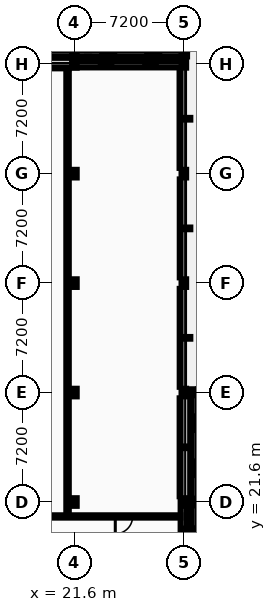
"""IFC4 building model, lengths in metres.
Left out: names, types, materials, properties, quantities, classifications, styles, units other than length and angle.
Written with IfcOpenShell. Run it as: python <this file> out.ifc"""

import sys

from ifc_helpers import new_model, si_unit, direction, frame, frame_2d, origin, origin_2d, place, context, subcontext, project, spatial, rectangle, i_section, extrude, element, fill, save


model = new_model("IFC4")
c1 = context("Model", 3, precision=1e-05, world=origin(), true_north=direction((0.0, 1.0)))
c2 = subcontext(c1, "Body", "Model", "MODEL_VIEW")
j1 = project(units=[si_unit("LENGTHUNIT", "METRE"), si_unit("PLANEANGLEUNIT", "RADIAN")], contexts=[c1])
p1 = place(None, origin())
s1 = spatial("IfcSite", under=j1, at=p1, CompositionType="ELEMENT")
p2 = place(p1, origin())
s2 = spatial("IfcBuilding", under=s1, at=p2, CompositionType="ELEMENT")
p3 = place(p2, origin())
s3 = spatial("IfcBuildingStorey", under=s2, at=p3, CompositionType="ELEMENT", Elevation=0.0)
for number, where, z_axis, x_axis in (
    (1, (21.6, 21.6, 0.0), (0.0, 0.0, 1.0), (1.0, 0.0, 0.0)),
    (2, (21.6, 28.8, 0.0), (0.0, 0.0, 1.0), (1.0, 0.0, 0.0)),
    (3, (21.6, 36.0, 0.0), (0.0, 0.0, 1.0), (1.0, 0.0, 0.0)),
    (4, (21.6, 43.2, 0.0), (0.0, 0.0, 1.0), (1.0, 0.0, 0.0)),
):
    element("IfcColumn", number, at=place(p3, frame(where, z_axis=z_axis, x_axis=x_axis)), inside=s3, PredefinedType="COLUMN", context=c2, shape_type="SweptSolid", body=[
        extrude(i_section(OverallWidth=0.3, OverallDepth=0.5, WebThickness=0.014, FlangeThickness=0.028, FilletRadius=0.027, at=origin_2d()), origin(), (0.0, 0.0, 1.0), 5.2),
    ])
p4 = place(p3, frame((21.6, 50.4, 0.0), z_axis=(0.0, 0.0, 1.0), x_axis=(1.0, 0.0, 0.0)))
e5 = element("IfcColumn", 5, at=p4, inside=s3, PredefinedType="COLUMN", context=c2, shape_type="SweptSolid", body=[
    extrude(i_section(OverallWidth=0.3, OverallDepth=0.45, WebThickness=0.014, FlangeThickness=0.026, FilletRadius=0.027, at=origin_2d()), origin(), (0.0, 0.0, 1.0), 5.2),
])
p5 = place(p3, frame((21.6, 51.12, 0.0), z_axis=(0.0, 0.0, 1.0), x_axis=(1.0, 0.0, 0.0)))
e6 = element("IfcColumn", 6, at=p5, inside=s3, PredefinedType="COLUMN", context=c2, shape_type="SweptSolid", body=[
    extrude(i_section(OverallWidth=0.3, OverallDepth=0.36, WebThickness=0.012, FlangeThickness=0.022, FilletRadius=0.027, at=origin_2d()), origin(), (0.0, 0.0, 1.0), 5.2),
])
for number, where, z_axis, x_axis in (
    (7, (28.8, 21.6, 0.0), (0.0, 0.0, 1.0), (1.0, 0.0, 0.0)),
    (8, (28.8, 28.8, 0.0), (0.0, 0.0, 1.0), (1.0, 0.0, 0.0)),
    (9, (28.8, 36.0, 0.0), (0.0, 0.0, 1.0), (1.0, 0.0, 0.0)),
    (10, (28.8, 43.2, 0.0), (0.0, 0.0, 1.0), (1.0, 0.0, 0.0)),
):
    element("IfcColumn", number, at=place(p3, frame(where, z_axis=z_axis, x_axis=x_axis)), inside=s3, PredefinedType="COLUMN", context=c2, shape_type="SweptSolid", body=[
        extrude(i_section(OverallWidth=0.3, OverallDepth=0.5, WebThickness=0.014, FlangeThickness=0.028, FilletRadius=0.027, at=origin_2d()), origin(), (0.0, 0.0, 1.0), 5.2),
    ])
p6 = place(p3, frame((28.8, 50.4, 0.0), z_axis=(0.0, 0.0, 1.0), x_axis=(1.0, 0.0, 0.0)))
e11 = element("IfcColumn", 11, at=p6, inside=s3, PredefinedType="COLUMN", context=c2, shape_type="SweptSolid", body=[
    extrude(i_section(OverallWidth=0.3, OverallDepth=0.45, WebThickness=0.014, FlangeThickness=0.026, FilletRadius=0.027, at=origin_2d()), origin(), (0.0, 0.0, 1.0), 5.2),
])
p7 = place(p3, frame((28.8, 51.12, 0.0), z_axis=(0.0, 0.0, 1.0), x_axis=(1.0, 0.0, 0.0)))
e12 = element("IfcColumn", 12, at=p7, inside=s3, PredefinedType="COLUMN", context=c2, shape_type="SweptSolid", body=[
    extrude(i_section(OverallWidth=0.3, OverallDepth=0.36, WebThickness=0.012, FlangeThickness=0.022, FilletRadius=0.027, at=origin_2d()), origin(), (0.0, 0.0, 1.0), 5.2),
])
p8 = place(p3, frame((29.52, 21.6, 0.0), z_axis=(0.0, 0.0, 1.0), x_axis=(1.0, 0.0, 0.0)))
e13 = element("IfcColumn", 13, at=p8, inside=s3, PredefinedType="COLUMN", context=c2, shape_type="SweptSolid", body=[
    extrude(i_section(OverallWidth=0.3, OverallDepth=0.45, WebThickness=0.014, FlangeThickness=0.026, FilletRadius=0.027, at=origin_2d()), origin(), (0.0, 0.0, 1.0), 5.2),
])
p9 = place(p3, frame((29.52, 28.8, 0.0), z_axis=(0.0, 0.0, 1.0), x_axis=(1.0, 0.0, 0.0)))
e14 = element("IfcColumn", 14, at=p9, inside=s3, PredefinedType="COLUMN", context=c2, shape_type="SweptSolid", body=[
    extrude(i_section(OverallWidth=0.3, OverallDepth=0.36, WebThickness=0.012, FlangeThickness=0.022, FilletRadius=0.027, at=origin_2d()), origin(), (0.0, 0.0, 1.0), 5.2),
])
p10 = place(p3, frame((28.8, 50.4, 0.0), z_axis=(0.0, 0.0, 1.0), x_axis=(-1.0, 0.0, 0.0)))
e15 = element("IfcWall", 15, at=p10, inside=s3, PredefinedType="STANDARD", context=c2, shape_type="SweptSolid", body=[
    extrude(rectangle(XDim=7.31, YDim=0.42, at=frame_2d((3.655, 0.0))), origin(), (0.0, 0.0, 1.0), 4.665),
])
p11 = place(p10, frame((1.743, 0.0, 1.1)))
e16 = element("IfcOpeningElement", 16, at=p11, cuts=e15, PredefinedType="OPENING", context=c2, shape_type="SweptSolid", body=[
    extrude(rectangle(XDim=0.9, YDim=1.6, at=frame_2d((0.45, 0.8))), frame((0.0, 0.22, 0.0), z_axis=(0.0, -1.0, 0.0), x_axis=(1.0, 0.0, 0.0)), (0.0, 0.0, 1.0), 0.44),
])
p12 = place(p10, frame((4.667, 0.0, 1.1)))
e17 = element("IfcOpeningElement", 17, at=p12, cuts=e15, PredefinedType="OPENING", context=c2, shape_type="SweptSolid", body=[
    extrude(rectangle(XDim=0.9, YDim=1.6, at=frame_2d((0.45, 0.8))), frame((0.0, 0.22, 0.0), z_axis=(0.0, -1.0, 0.0), x_axis=(1.0, 0.0, 0.0)), (0.0, 0.0, 1.0), 0.44),
])
p13 = place(p3, frame((28.8, 14.45, 0.0), z_axis=(0.0, 0.0, 1.0), x_axis=(0.0, 1.0, 0.0)))
e18 = element("IfcWall", 18, at=p13, inside=s3, PredefinedType="STANDARD", context=c2, shape_type="SweptSolid", body=[
    extrude(rectangle(XDim=7.15, YDim=0.42, at=frame_2d((3.575, 0.0))), origin(), (0.0, 0.0, 1.0), 4.97),
])
p14 = place(p13, frame((1.647, 0.0, 0.95)))
e19 = element("IfcOpeningElement", 19, at=p14, cuts=e18, PredefinedType="OPENING", context=c2, shape_type="SweptSolid", body=[
    extrude(rectangle(XDim=0.996, YDim=1.26, at=frame_2d((0.498, 0.63))), frame((0.0, 0.22, 0.0), z_axis=(0.0, -1.0, 0.0), x_axis=(1.0, 0.0, 0.0)), (0.0, 0.0, 1.0), 0.44),
])
p15 = place(p13, frame((4.507, 0.0, 0.95)))
e20 = element("IfcOpeningElement", 20, at=p15, cuts=e18, PredefinedType="OPENING", context=c2, shape_type="SweptSolid", body=[
    extrude(rectangle(XDim=0.996, YDim=1.26, at=frame_2d((0.498, 0.63))), frame((0.0, 0.22, 0.0), z_axis=(0.0, -1.0, 0.0), x_axis=(1.0, 0.0, 0.0)), (0.0, 0.0, 1.0), 0.44),
])
p16 = place(p3, frame((29.52, 21.6, 0.0), z_axis=(0.0, 0.0, 1.0), x_axis=(0.0, -1.0, 0.0)))
e21 = element("IfcWall", 21, at=p16, inside=s3, PredefinedType="STANDARD", context=c2, shape_type="SweptSolid", body=[
    extrude(rectangle(XDim=7.2, YDim=0.42, at=frame_2d((3.6, 0.0))), origin(), (0.0, 0.0, 1.0), 4.665),
])
p17 = place(p16, frame((1.628, 0.0, 0.95)))
e22 = element("IfcOpeningElement", 22, at=p17, cuts=e21, PredefinedType="OPENING", context=c2, shape_type="SweptSolid", body=[
    extrude(rectangle(XDim=1.064, YDim=1.296, at=frame_2d((0.532, 0.648))), frame((0.0, 0.22, 0.0), z_axis=(0.0, -1.0, 0.0), x_axis=(1.0, 0.0, 0.0)), (0.0, 0.0, 1.0), 0.44),
])
p18 = place(p16, frame((4.508, 0.0, 0.95)))
e23 = element("IfcOpeningElement", 23, at=p18, cuts=e21, PredefinedType="OPENING", context=c2, shape_type="SweptSolid", body=[
    extrude(rectangle(XDim=1.064, YDim=1.296, at=frame_2d((0.532, 0.648))), frame((0.0, 0.22, 0.0), z_axis=(0.0, -1.0, 0.0), x_axis=(1.0, 0.0, 0.0)), (0.0, 0.0, 1.0), 0.44),
])
p19 = place(p3, frame((29.52, 29.01, 0.0), z_axis=(0.0, 0.0, 1.0), x_axis=(0.0, -1.0, 0.0)))
e24 = element("IfcWall", 24, at=p19, inside=s3, PredefinedType="STANDARD", context=c2, shape_type="SweptSolid", body=[
    extrude(rectangle(XDim=7.41, YDim=0.42, at=frame_2d((3.705, 0.0))), origin(), (0.0, 0.0, 1.0), 4.665),
])
p20 = place(p19, frame((1.674, 0.0, 0.95)))
e25 = element("IfcOpeningElement", 25, at=p20, cuts=e24, PredefinedType="OPENING", context=c2, shape_type="SweptSolid", body=[
    extrude(rectangle(XDim=1.098, YDim=1.296, at=frame_2d((0.549, 0.648))), frame((0.0, 0.22, 0.0), z_axis=(0.0, -1.0, 0.0), x_axis=(1.0, 0.0, 0.0)), (0.0, 0.0, 1.0), 0.44),
])
p21 = place(p19, frame((4.638, 0.0, 0.95)))
e26 = element("IfcOpeningElement", 26, at=p21, cuts=e24, PredefinedType="OPENING", context=c2, shape_type="SweptSolid", body=[
    extrude(rectangle(XDim=1.098, YDim=1.296, at=frame_2d((0.549, 0.648))), frame((0.0, 0.22, 0.0), z_axis=(0.0, -1.0, 0.0), x_axis=(1.0, 0.0, 0.0)), (0.0, 0.0, 1.0), 0.44),
])
p22 = place(p3, frame((14.4, 51.12, 0.0), z_axis=(0.0, 0.0, 1.0), x_axis=(1.0, 0.0, 0.0)))
e27 = element("IfcWall", 27, at=p22, inside=s3, PredefinedType="STANDARD", context=c2, shape_type="SweptSolid", body=[
    extrude(rectangle(XDim=7.2, YDim=0.42, at=frame_2d((3.6, 0.0))), origin(), (0.0, 0.0, 1.0), 4.635),
])
p23 = place(p22, frame((1.679, 0.0, 0.95)))
e28 = element("IfcOpeningElement", 28, at=p23, cuts=e27, PredefinedType="OPENING", context=c2, shape_type="SweptSolid", body=[
    extrude(rectangle(XDim=0.962, YDim=1.404, at=frame_2d((0.481, 0.702))), frame((0.0, 0.22, 0.0), z_axis=(0.0, -1.0, 0.0), x_axis=(1.0, 0.0, 0.0)), (0.0, 0.0, 1.0), 0.44),
])
p24 = place(p22, frame((4.559, 0.0, 0.95)))
e29 = element("IfcOpeningElement", 29, at=p24, cuts=e27, PredefinedType="OPENING", context=c2, shape_type="SweptSolid", body=[
    extrude(rectangle(XDim=0.962, YDim=1.404, at=frame_2d((0.481, 0.702))), frame((0.0, 0.22, 0.0), z_axis=(0.0, -1.0, 0.0), x_axis=(1.0, 0.0, 0.0)), (0.0, 0.0, 1.0), 0.44),
])
p25 = place(p3, frame((21.6, 51.12, 0.0), z_axis=(0.0, 0.0, 1.0), x_axis=(1.0, 0.0, 0.0)))
e30 = element("IfcWall", 30, at=p25, inside=s3, PredefinedType="STANDARD", context=c2, shape_type="SweptSolid", body=[
    extrude(rectangle(XDim=7.41, YDim=0.42, at=frame_2d((3.705, 0.0))), origin(), (0.0, 0.0, 1.0), 4.635),
])
p26 = place(p25, frame((1.725, 0.0, 0.95)))
e31 = element("IfcOpeningElement", 31, at=p26, cuts=e30, PredefinedType="OPENING", context=c2, shape_type="SweptSolid", body=[
    extrude(rectangle(XDim=0.996, YDim=1.404, at=frame_2d((0.498, 0.702))), frame((0.0, 0.22, 0.0), z_axis=(0.0, -1.0, 0.0), x_axis=(1.0, 0.0, 0.0)), (0.0, 0.0, 1.0), 0.44),
])
p27 = place(p25, frame((4.689, 0.0, 0.95)))
e32 = element("IfcOpeningElement", 32, at=p27, cuts=e30, PredefinedType="OPENING", context=c2, shape_type="SweptSolid", body=[
    extrude(rectangle(XDim=0.996, YDim=1.404, at=frame_2d((0.498, 0.702))), frame((0.0, 0.22, 0.0), z_axis=(0.0, -1.0, 0.0), x_axis=(1.0, 0.0, 0.0)), (0.0, 0.0, 1.0), 0.44),
])
p28 = place(p3, frame((14.7, 20.65, 0.0), z_axis=(0.0, 0.0, 1.0), x_axis=(1.0, 0.0, 0.0)))
e33 = element("IfcWall", 33, at=p28, inside=s3, PredefinedType="PARTITIONING", context=c2, shape_type="SweptSolid", body=[
    extrude(rectangle(XDim=13.87, YDim=0.15, at=frame_2d((6.935, 0.0))), origin(), (0.0, 0.0, 1.0), 4.97),
])
p29 = place(p28, frame((2.681, 0.0, 0.0)))
e34 = element("IfcOpeningElement", 34, at=p29, cuts=e33, PredefinedType="OPENING", context=c2, shape_type="SweptSolid", body=[
    extrude(rectangle(XDim=1.088, YDim=2.068, at=frame_2d((0.544, 1.034))), frame((0.0, 0.085, 0.0), z_axis=(0.0, -1.0, 0.0), x_axis=(1.0, 0.0, 0.0)), (0.0, 0.0, 1.0), 0.17),
])
p30 = place(p28, frame((9.59, 0.0, 0.0)))
e35 = element("IfcOpeningElement", 35, at=p30, cuts=e33, PredefinedType="OPENING", context=c2, shape_type="SweptSolid", body=[
    extrude(rectangle(XDim=1.14, YDim=2.068, at=frame_2d((0.57, 1.034))), frame((0.0, 0.085, 0.0), z_axis=(0.0, -1.0, 0.0), x_axis=(1.0, 0.0, 0.0)), (0.0, 0.0, 1.0), 0.17),
])
p31 = place(p3, frame((14.78, 50.2, 0.0), z_axis=(0.0, 0.0, 1.0), x_axis=(1.0, 0.0, 0.0)))
e36 = element("IfcWall", 36, at=p31, inside=s3, PredefinedType="PARTITIONING", context=c2, shape_type="SweptSolid", body=[
    extrude(rectangle(XDim=6.44, YDim=0.142, at=frame_2d((3.22, 0.0))), origin(), (0.0, 0.0, 1.0), 4.665),
])
p32 = place(p3, frame((21.15, 20.725, 0.0), z_axis=(0.0, 0.0, 1.0), x_axis=(0.0, 1.0, 0.0)))
e37 = element("IfcWall", 37, at=p32, inside=s3, PredefinedType="PARTITIONING", context=c2, shape_type="SweptSolid", body=[
    extrude(rectangle(XDim=29.404, YDim=0.16, at=frame_2d((14.702, 0.0))), origin(), (0.0, 0.0, 1.0), 4.97),
])
p33 = place(p3, frame((28.6, 21.98, 0.0), z_axis=(0.0, 0.0, 1.0), x_axis=(0.0, 1.0, 0.0)))
e38 = element("IfcWall", 38, at=p33, inside=s3, PredefinedType="PARTITIONING", context=c2, shape_type="SweptSolid", body=[
    extrude(rectangle(XDim=6.44, YDim=0.15, at=frame_2d((3.22, 0.0))), origin(), (0.0, 0.0, 1.0), 4.665),
])
p34 = place(p3, frame((28.6, 29.18, 0.0), z_axis=(0.0, 0.0, 1.0), x_axis=(0.0, 1.0, 0.0)))
e39 = element("IfcWall", 39, at=p34, inside=s3, PredefinedType="PARTITIONING", context=c2, shape_type="SweptSolid", body=[
    extrude(rectangle(XDim=6.44, YDim=0.142, at=frame_2d((3.22, 0.0))), origin(), (0.0, 0.0, 1.0), 4.595),
])
p35 = place(p3, frame((28.6, 36.38, 0.0), z_axis=(0.0, 0.0, 1.0), x_axis=(0.0, 1.0, 0.0)))
e40 = element("IfcWall", 40, at=p35, inside=s3, PredefinedType="PARTITIONING", context=c2, shape_type="SweptSolid", body=[
    extrude(rectangle(XDim=6.44, YDim=0.135, at=frame_2d((3.22, 0.0))), origin(), (0.0, 0.0, 1.0), 4.595),
])
p36 = place(p3, frame((28.6, 43.58, 0.0), z_axis=(0.0, 0.0, 1.0), x_axis=(0.0, 1.0, 0.0)))
e41 = element("IfcWall", 41, at=p36, inside=s3, PredefinedType="PARTITIONING", context=c2, shape_type="SweptSolid", body=[
    extrude(rectangle(XDim=6.44, YDim=0.16, at=frame_2d((3.22, 0.0))), origin(), (0.0, 0.0, 1.0), 4.595),
])
p37 = place(p11, origin())
e42 = element("IfcWindow", 42, at=p37, inside=s3, PartitioningType="SINGLE_PANEL", PredefinedType="WINDOW", context=c2, shape_type="SweptSolid", body=[
    extrude(rectangle(XDim=0.9, YDim=1.6, at=frame_2d((0.45, 0.8))), frame((0.0, 0.03, 0.0), z_axis=(0.0, -1.0, 0.0), x_axis=(1.0, 0.0, 0.0)), (0.0, 0.0, 1.0), 0.06),
])
fill(e16, e42)
p38 = place(p12, origin())
e43 = element("IfcWindow", 43, at=p38, inside=s3, PartitioningType="SINGLE_PANEL", PredefinedType="WINDOW", context=c2, shape_type="SweptSolid", body=[
    extrude(rectangle(XDim=0.9, YDim=1.6, at=frame_2d((0.45, 0.8))), frame((0.0, 0.03, 0.0), z_axis=(0.0, -1.0, 0.0), x_axis=(1.0, 0.0, 0.0)), (0.0, 0.0, 1.0), 0.06),
])
fill(e17, e43)
p39 = place(p15, origin())
e44 = element("IfcWindow", 44, at=p39, inside=s3, PartitioningType="SINGLE_PANEL", PredefinedType="WINDOW", context=c2, shape_type="SweptSolid", body=[
    extrude(rectangle(XDim=0.996, YDim=1.26, at=frame_2d((0.498, 0.63))), frame((0.0, 0.03, 0.0), z_axis=(0.0, -1.0, 0.0), x_axis=(1.0, 0.0, 0.0)), (0.0, 0.0, 1.0), 0.06),
])
fill(e20, e44)
p40 = place(p17, origin())
e45 = element("IfcWindow", 45, at=p40, inside=s3, PartitioningType="SINGLE_PANEL", PredefinedType="WINDOW", context=c2, shape_type="SweptSolid", body=[
    extrude(rectangle(XDim=1.064, YDim=1.296, at=frame_2d((0.532, 0.648))), frame((0.0, 0.03, 0.0), z_axis=(0.0, -1.0, 0.0), x_axis=(1.0, 0.0, 0.0)), (0.0, 0.0, 1.0), 0.06),
])
fill(e22, e45)
p41 = place(p20, origin())
e46 = element("IfcWindow", 46, at=p41, inside=s3, PartitioningType="SINGLE_PANEL", PredefinedType="WINDOW", context=c2, shape_type="SweptSolid", body=[
    extrude(rectangle(XDim=1.098, YDim=1.296, at=frame_2d((0.549, 0.648))), frame((0.0, 0.03, 0.0), z_axis=(0.0, -1.0, 0.0), x_axis=(1.0, 0.0, 0.0)), (0.0, 0.0, 1.0), 0.06),
])
fill(e25, e46)
p42 = place(p21, origin())
e47 = element("IfcWindow", 47, at=p42, inside=s3, PartitioningType="SINGLE_PANEL", PredefinedType="WINDOW", context=c2, shape_type="SweptSolid", body=[
    extrude(rectangle(XDim=1.098, YDim=1.296, at=frame_2d((0.549, 0.648))), frame((0.0, 0.03, 0.0), z_axis=(0.0, -1.0, 0.0), x_axis=(1.0, 0.0, 0.0)), (0.0, 0.0, 1.0), 0.06),
])
fill(e26, e47)
p43 = place(p26, origin())
e48 = element("IfcWindow", 48, at=p43, inside=s3, PartitioningType="SINGLE_PANEL", PredefinedType="WINDOW", context=c2, shape_type="SweptSolid", body=[
    extrude(rectangle(XDim=0.996, YDim=1.404, at=frame_2d((0.498, 0.702))), frame((0.0, 0.03, 0.0), z_axis=(0.0, -1.0, 0.0), x_axis=(1.0, 0.0, 0.0)), (0.0, 0.0, 1.0), 0.06),
])
fill(e31, e48)
p44 = place(p27, origin())
e49 = element("IfcWindow", 49, at=p44, inside=s3, PartitioningType="SINGLE_PANEL", PredefinedType="WINDOW", context=c2, shape_type="SweptSolid", body=[
    extrude(rectangle(XDim=0.996, YDim=1.404, at=frame_2d((0.498, 0.702))), frame((0.0, 0.03, 0.0), z_axis=(0.0, -1.0, 0.0), x_axis=(1.0, 0.0, 0.0)), (0.0, 0.0, 1.0), 0.06),
])
fill(e32, e49)
p45 = place(p30, frame((1.14, 0.0, 0.0), z_axis=(0.0, 0.0, 1.0), x_axis=(-1.0, 0.0, 0.0)))
e50 = element("IfcDoor", 50, at=p45, inside=s3, OperationType="SINGLE_SWING_LEFT", PredefinedType="DOOR", context=c2, shape_type="SweptSolid", body=[
    extrude(rectangle(XDim=1.14, YDim=2.068, at=frame_2d((0.57, 1.034))), frame((0.0, 0.025, 0.0), z_axis=(0.0, -1.0, 0.0), x_axis=(1.0, 0.0, 0.0)), (0.0, 0.0, 1.0), 0.05),
])
fill(e35, e50)
save(model, sys.argv[1])
